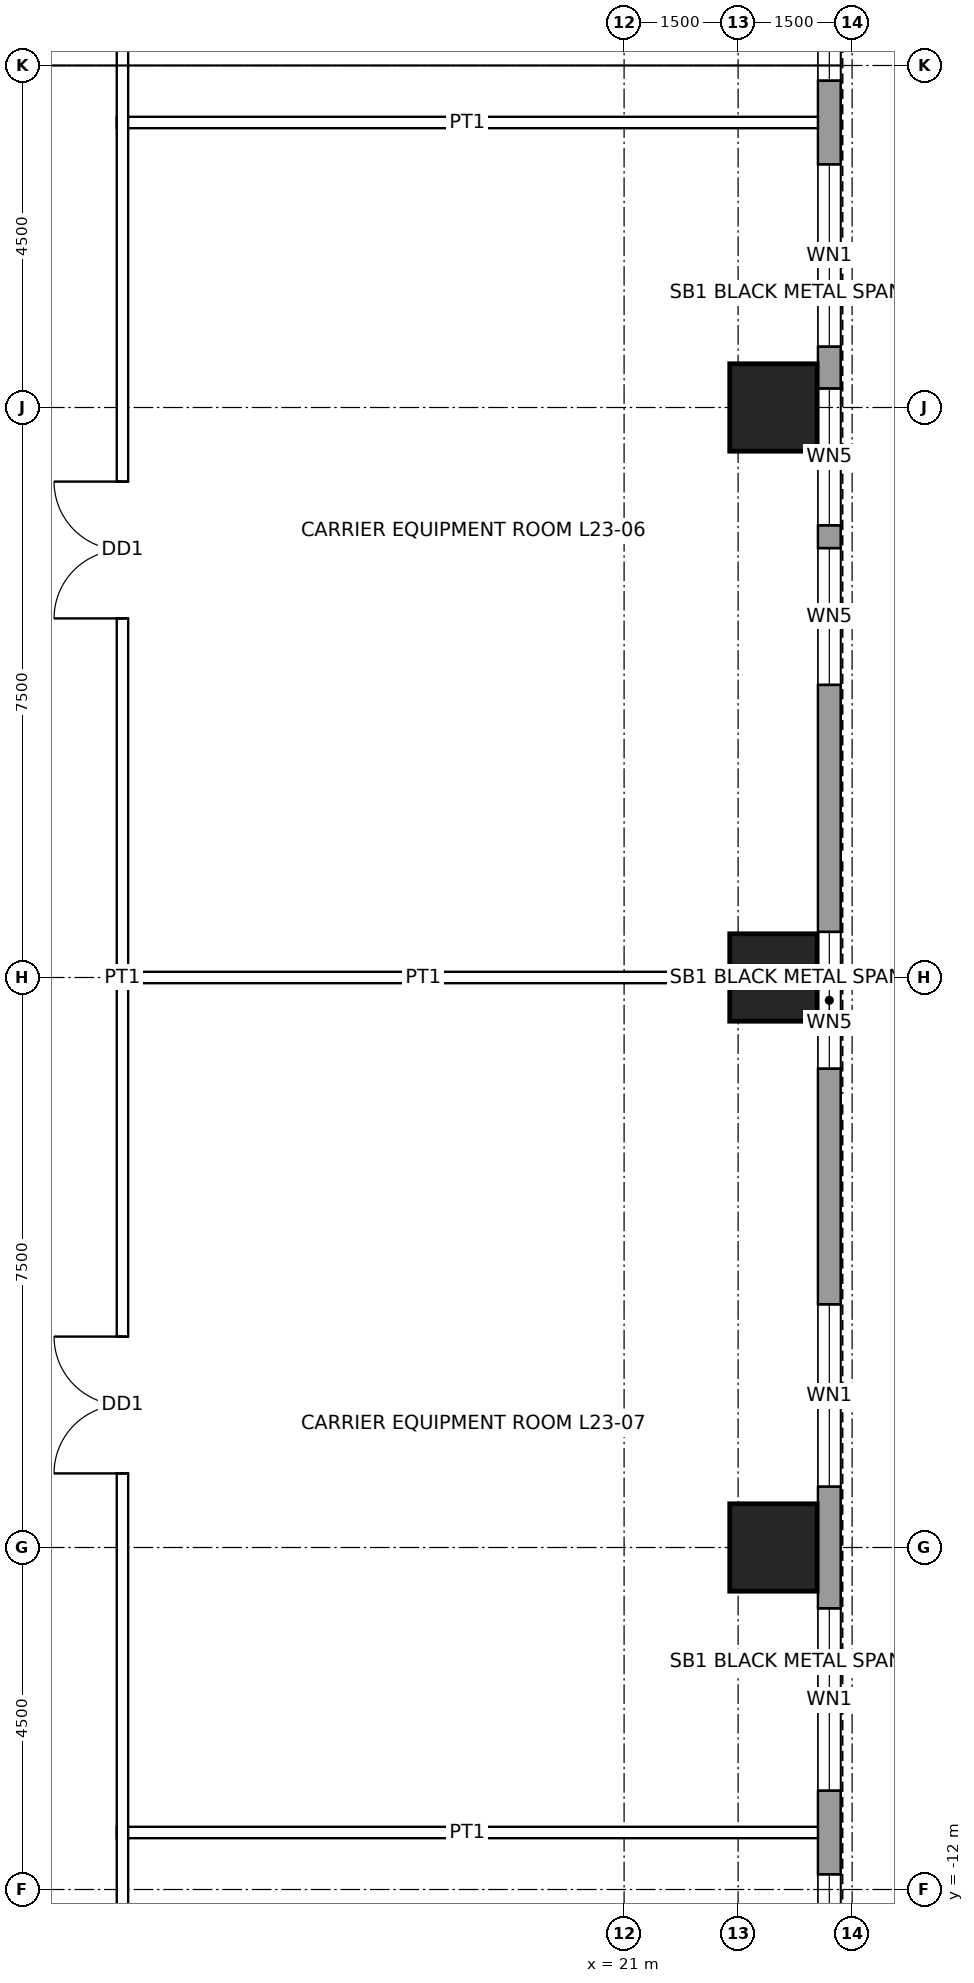
"""IFC4 building model, lengths in metres.
Left out: names, types, materials, properties, quantities, classifications, styles, units other than length and angle.
Written with IfcOpenShell. Run it as: python <this file> out.ifc"""

import sys

from ifc_helpers import new_model, si_unit, direction, frame, frame_2d, origin, origin_2d, place, context, subcontext, project, spatial, rectangle, hollow_rectangle, extrude, element, fill, save


model = new_model("IFC4")
c1 = context("Model", 3, precision=1e-05, world=origin(), true_north=direction((0.0, 1.0)))
c2 = subcontext(c1, "Body", "Model", "MODEL_VIEW")
j1 = project(units=[si_unit("LENGTHUNIT", "METRE"), si_unit("PLANEANGLEUNIT", "RADIAN")], contexts=[c1])
p1 = place(None, origin())
s1 = spatial("IfcSite", under=j1, at=p1, CompositionType="ELEMENT")
p2 = place(p1, origin())
s2 = spatial("IfcBuilding", under=s1, at=p2, CompositionType="ELEMENT")
p3 = place(p2, frame((0.0, 0.0, 117.9)))
s3 = spatial("IfcBuildingStorey", under=s2, at=p3, CompositionType="ELEMENT", Elevation=117.9)
for number, where, z_axis, x_axis in (
    (1, (22.965, 7.5, 0.0), (0.0, 0.0, 1.0), (1.0, 0.0, 0.0)),
    (2, (22.965, 0.0, 0.0), (0.0, 0.0, 1.0), (1.0, 0.0, 0.0)),
    (3, (22.965, -7.5, 0.0), (0.0, 0.0, 1.0), (1.0, 0.0, 0.0)),
):
    element("IfcColumn", number, at=place(p3, frame(where, z_axis=z_axis, x_axis=x_axis)), inside=s3, PredefinedType="COLUMN", context=c2, shape_type="SweptSolid", body=[
        extrude(hollow_rectangle(XDim=1.15, YDim=1.15, WallThickness=0.075, at=origin_2d()), origin(), (0.0, 0.0, 1.0), 4.5),
    ])
p4 = place(p3, frame((23.7, 16.2, 0.0), z_axis=(0.0, 0.0, 1.0), x_axis=(0.0, -1.0, 0.0)))
e4 = element("IfcWall", 4, at=p4, inside=s3, PredefinedType="SOLIDWALL", context=c2, shape_type="SweptSolid", body=[
    extrude(rectangle(XDim=32.4, YDim=0.3, at=frame_2d((16.2, 0.0))), origin(), (0.0, 0.0, 1.0), 4.3),
])
p5 = place(p4, frame((2.0, 0.0, 1.0)))
e5 = element("IfcOpeningElement", 5, at=p5, cuts=e4, PredefinedType="OPENING", context=c2, shape_type="SweptSolid", body=[
    extrude(rectangle(XDim=2.4, YDim=1.2, at=frame_2d((1.2, 0.6))), frame((0.0, 0.16, 0.0), z_axis=(0.0, -1.0, 0.0), x_axis=(1.0, 0.0, 0.0)), (0.0, 0.0, 1.0), 0.32),
])
p6 = place(p4, frame((5.5, 0.0, 1.0)))
e6 = element("IfcOpeningElement", 6, at=p6, cuts=e4, PredefinedType="OPENING", context=c2, shape_type="SweptSolid", body=[
    extrude(rectangle(XDim=2.4, YDim=1.2, at=frame_2d((1.2, 0.6))), frame((0.0, 0.16, 0.0), z_axis=(0.0, -1.0, 0.0), x_axis=(1.0, 0.0, 0.0)), (0.0, 0.0, 1.0), 0.32),
])
p7 = place(p4, frame((8.45, 0.0, 1.0)))
e7 = element("IfcOpeningElement", 7, at=p7, cuts=e4, PredefinedType="OPENING", context=c2, shape_type="SweptSolid", body=[
    extrude(rectangle(XDim=1.8, YDim=1.2, at=frame_2d((0.9, 0.6))), frame((0.0, 0.16, 0.0), z_axis=(0.0, -1.0, 0.0), x_axis=(1.0, 0.0, 0.0)), (0.0, 0.0, 1.0), 0.32),
])
p8 = place(p4, frame((10.55, 0.0, 1.0)))
e8 = element("IfcOpeningElement", 8, at=p8, cuts=e4, PredefinedType="OPENING", context=c2, shape_type="SweptSolid", body=[
    extrude(rectangle(XDim=1.8, YDim=1.2, at=frame_2d((0.9, 0.6))), frame((0.0, 0.16, 0.0), z_axis=(0.0, -1.0, 0.0), x_axis=(1.0, 0.0, 0.0)), (0.0, 0.0, 1.0), 0.32),
])
p9 = place(p4, frame((15.6, 0.0, 1.0)))
e9 = element("IfcOpeningElement", 9, at=p9, cuts=e4, PredefinedType="OPENING", context=c2, shape_type="SweptSolid", body=[
    extrude(rectangle(XDim=1.8, YDim=1.2, at=frame_2d((0.9, 0.6))), frame((0.0, 0.16, 0.0), z_axis=(0.0, -1.0, 0.0), x_axis=(1.0, 0.0, 0.0)), (0.0, 0.0, 1.0), 0.32),
])
p10 = place(p4, frame((20.5, 0.0, 1.0)))
e10 = element("IfcOpeningElement", 10, at=p10, cuts=e4, PredefinedType="OPENING", context=c2, shape_type="SweptSolid", body=[
    extrude(rectangle(XDim=2.4, YDim=1.2, at=frame_2d((1.2, 0.6))), frame((0.0, 0.16, 0.0), z_axis=(0.0, -1.0, 0.0), x_axis=(1.0, 0.0, 0.0)), (0.0, 0.0, 1.0), 0.32),
])
p11 = place(p4, frame((24.5, 0.0, 1.0)))
e11 = element("IfcOpeningElement", 11, at=p11, cuts=e4, PredefinedType="OPENING", context=c2, shape_type="SweptSolid", body=[
    extrude(rectangle(XDim=2.4, YDim=1.2, at=frame_2d((1.2, 0.6))), frame((0.0, 0.16, 0.0), z_axis=(0.0, -1.0, 0.0), x_axis=(1.0, 0.0, 0.0)), (0.0, 0.0, 1.0), 0.32),
])
p12 = place(p4, frame((28.0, 0.0, 1.0)))
e12 = element("IfcOpeningElement", 12, at=p12, cuts=e4, PredefinedType="OPENING", context=c2, shape_type="SweptSolid", body=[
    extrude(rectangle(XDim=2.4, YDim=1.2, at=frame_2d((1.2, 0.6))), frame((0.0, 0.16, 0.0), z_axis=(0.0, -1.0, 0.0), x_axis=(1.0, 0.0, 0.0)), (0.0, 0.0, 1.0), 0.32),
])
p13 = place(p3, frame((14.325, -11.25, 0.0), z_axis=(0.0, 0.0, 1.0), x_axis=(1.0, 0.0, 0.0)))
e13 = element("IfcWall", 13, at=p13, inside=s3, PredefinedType="PARTITIONING", context=c2, shape_type="SweptSolid", body=[
    extrude(rectangle(XDim=9.225, YDim=0.15, at=frame_2d((4.613, 0.0))), origin(), (0.0, 0.0, 1.0), 3.431),
])
p14 = place(p3, frame((14.325, 0.0, 0.0), z_axis=(0.0, 0.0, 1.0), x_axis=(1.0, 0.0, 0.0)))
e14 = element("IfcWall", 14, at=p14, inside=s3, PredefinedType="PARTITIONING", context=c2, shape_type="SweptSolid", body=[
    extrude(rectangle(XDim=8.065, YDim=0.15, at=frame_2d((4.032, 0.0))), origin(), (0.0, 0.0, 1.0), 3.431),
])
p15 = place(p3, frame((14.325, 11.25, 0.0), z_axis=(0.0, 0.0, 1.0), x_axis=(1.0, 0.0, 0.0)))
e15 = element("IfcWall", 15, at=p15, inside=s3, PredefinedType="PARTITIONING", context=c2, shape_type="SweptSolid", body=[
    extrude(rectangle(XDim=9.225, YDim=0.15, at=frame_2d((4.613, 0.0))), origin(), (0.0, 0.0, 1.0), 3.431),
])
p16 = place(p3, frame((14.4, -14.475, 0.0), z_axis=(0.0, 0.0, 1.0), x_axis=(0.0, 1.0, 0.0)))
e16 = element("IfcWall", 16, at=p16, inside=s3, PredefinedType="PARTITIONING", context=c2, shape_type="SweptSolid", body=[
    extrude(rectangle(XDim=28.95, YDim=0.15, at=frame_2d((14.475, 0.0))), origin(), (0.0, 0.0, 1.0), 4.3),
])
p17 = place(p16, frame((19.2, 0.0, 0.0)))
e17 = element("IfcOpeningElement", 17, at=p17, cuts=e16, PredefinedType="OPENING", context=c2, shape_type="SweptSolid", body=[
    extrude(rectangle(XDim=1.8, YDim=2.4, at=frame_2d((0.9, 1.2))), frame((0.0, 0.085, 0.0), z_axis=(0.0, -1.0, 0.0), x_axis=(1.0, 0.0, 0.0)), (0.0, 0.0, 1.0), 0.17),
])
p18 = place(p16, frame((7.95, 0.0, 0.0)))
e18 = element("IfcOpeningElement", 18, at=p18, cuts=e16, PredefinedType="OPENING", context=c2, shape_type="SweptSolid", body=[
    extrude(rectangle(XDim=1.8, YDim=2.4, at=frame_2d((0.9, 1.2))), frame((0.0, 0.085, 0.0), z_axis=(0.0, -1.0, 0.0), x_axis=(1.0, 0.0, 0.0)), (0.0, 0.0, 1.0), 0.17),
])
p19 = place(p5, origin())
e19 = element("IfcWindow", 19, at=p19, inside=s3, PartitioningType="SINGLE_PANEL", PredefinedType="WINDOW", context=c2, shape_type="SweptSolid", body=[
    extrude(rectangle(XDim=2.4, YDim=1.2, at=frame_2d((1.2, 0.6))), frame((0.0, 0.03, 0.0), z_axis=(0.0, -1.0, 0.0), x_axis=(1.0, 0.0, 0.0)), (0.0, 0.0, 1.0), 0.06),
])
fill(e5, e19)
p20 = place(p6, origin())
e20 = element("IfcWindow", 20, at=p20, inside=s3, PartitioningType="SINGLE_PANEL", PredefinedType="WINDOW", context=c2, shape_type="SweptSolid", body=[
    extrude(rectangle(XDim=2.4, YDim=1.2, at=frame_2d((1.2, 0.6))), frame((0.0, 0.03, 0.0), z_axis=(0.0, -1.0, 0.0), x_axis=(1.0, 0.0, 0.0)), (0.0, 0.0, 1.0), 0.06),
])
fill(e6, e20)
p21 = place(p7, origin())
e21 = element("IfcWindow", 21, at=p21, inside=s3, PartitioningType="SINGLE_PANEL", PredefinedType="WINDOW", context=c2, shape_type="SweptSolid", body=[
    extrude(rectangle(XDim=1.8, YDim=1.2, at=frame_2d((0.9, 0.6))), frame((0.0, 0.03, 0.0), z_axis=(0.0, -1.0, 0.0), x_axis=(1.0, 0.0, 0.0)), (0.0, 0.0, 1.0), 0.06),
])
fill(e7, e21)
p22 = place(p8, origin())
e22 = element("IfcWindow", 22, at=p22, inside=s3, PartitioningType="SINGLE_PANEL", PredefinedType="WINDOW", context=c2, shape_type="SweptSolid", body=[
    extrude(rectangle(XDim=1.8, YDim=1.2, at=frame_2d((0.9, 0.6))), frame((0.0, 0.03, 0.0), z_axis=(0.0, -1.0, 0.0), x_axis=(1.0, 0.0, 0.0)), (0.0, 0.0, 1.0), 0.06),
])
fill(e8, e22)
p23 = place(p9, origin())
e23 = element("IfcWindow", 23, at=p23, inside=s3, PartitioningType="SINGLE_PANEL", PredefinedType="WINDOW", context=c2, shape_type="SweptSolid", body=[
    extrude(rectangle(XDim=1.8, YDim=1.2, at=frame_2d((0.9, 0.6))), frame((0.0, 0.03, 0.0), z_axis=(0.0, -1.0, 0.0), x_axis=(1.0, 0.0, 0.0)), (0.0, 0.0, 1.0), 0.06),
])
fill(e9, e23)
p24 = place(p10, origin())
e24 = element("IfcWindow", 24, at=p24, inside=s3, PartitioningType="SINGLE_PANEL", PredefinedType="WINDOW", context=c2, shape_type="SweptSolid", body=[
    extrude(rectangle(XDim=2.4, YDim=1.2, at=frame_2d((1.2, 0.6))), frame((0.0, 0.03, 0.0), z_axis=(0.0, -1.0, 0.0), x_axis=(1.0, 0.0, 0.0)), (0.0, 0.0, 1.0), 0.06),
])
fill(e10, e24)
p25 = place(p11, origin())
e25 = element("IfcWindow", 25, at=p25, inside=s3, PartitioningType="SINGLE_PANEL", PredefinedType="WINDOW", context=c2, shape_type="SweptSolid", body=[
    extrude(rectangle(XDim=2.4, YDim=1.2, at=frame_2d((1.2, 0.6))), frame((0.0, 0.03, 0.0), z_axis=(0.0, -1.0, 0.0), x_axis=(1.0, 0.0, 0.0)), (0.0, 0.0, 1.0), 0.06),
])
fill(e11, e25)
p26 = place(p12, origin())
e26 = element("IfcWindow", 26, at=p26, inside=s3, PartitioningType="SINGLE_PANEL", PredefinedType="WINDOW", context=c2, shape_type="SweptSolid", body=[
    extrude(rectangle(XDim=2.4, YDim=1.2, at=frame_2d((1.2, 0.6))), frame((0.0, 0.03, 0.0), z_axis=(0.0, -1.0, 0.0), x_axis=(1.0, 0.0, 0.0)), (0.0, 0.0, 1.0), 0.06),
])
fill(e12, e26)
p27 = place(p17, origin())
e27 = element("IfcDoor", 27, at=p27, inside=s3, OperationType="DOUBLE_DOOR_SINGLE_SWING", PredefinedType="DOOR", context=c2, shape_type="SweptSolid", body=[
    extrude(rectangle(XDim=1.8, YDim=2.4, at=frame_2d((0.9, 1.2))), frame((0.0, 0.025, 0.0), z_axis=(0.0, -1.0, 0.0), x_axis=(1.0, 0.0, 0.0)), (0.0, 0.0, 1.0), 0.05),
])
fill(e17, e27)
p28 = place(p18, origin())
e28 = element("IfcDoor", 28, at=p28, inside=s3, OperationType="DOUBLE_DOOR_SINGLE_SWING", PredefinedType="DOOR", context=c2, shape_type="SweptSolid", body=[
    extrude(rectangle(XDim=1.8, YDim=2.4, at=frame_2d((0.9, 1.2))), frame((0.0, 0.025, 0.0), z_axis=(0.0, -1.0, 0.0), x_axis=(1.0, 0.0, 0.0)), (0.0, 0.0, 1.0), 0.05),
])
fill(e18, e28)
save(model, sys.argv[1])
